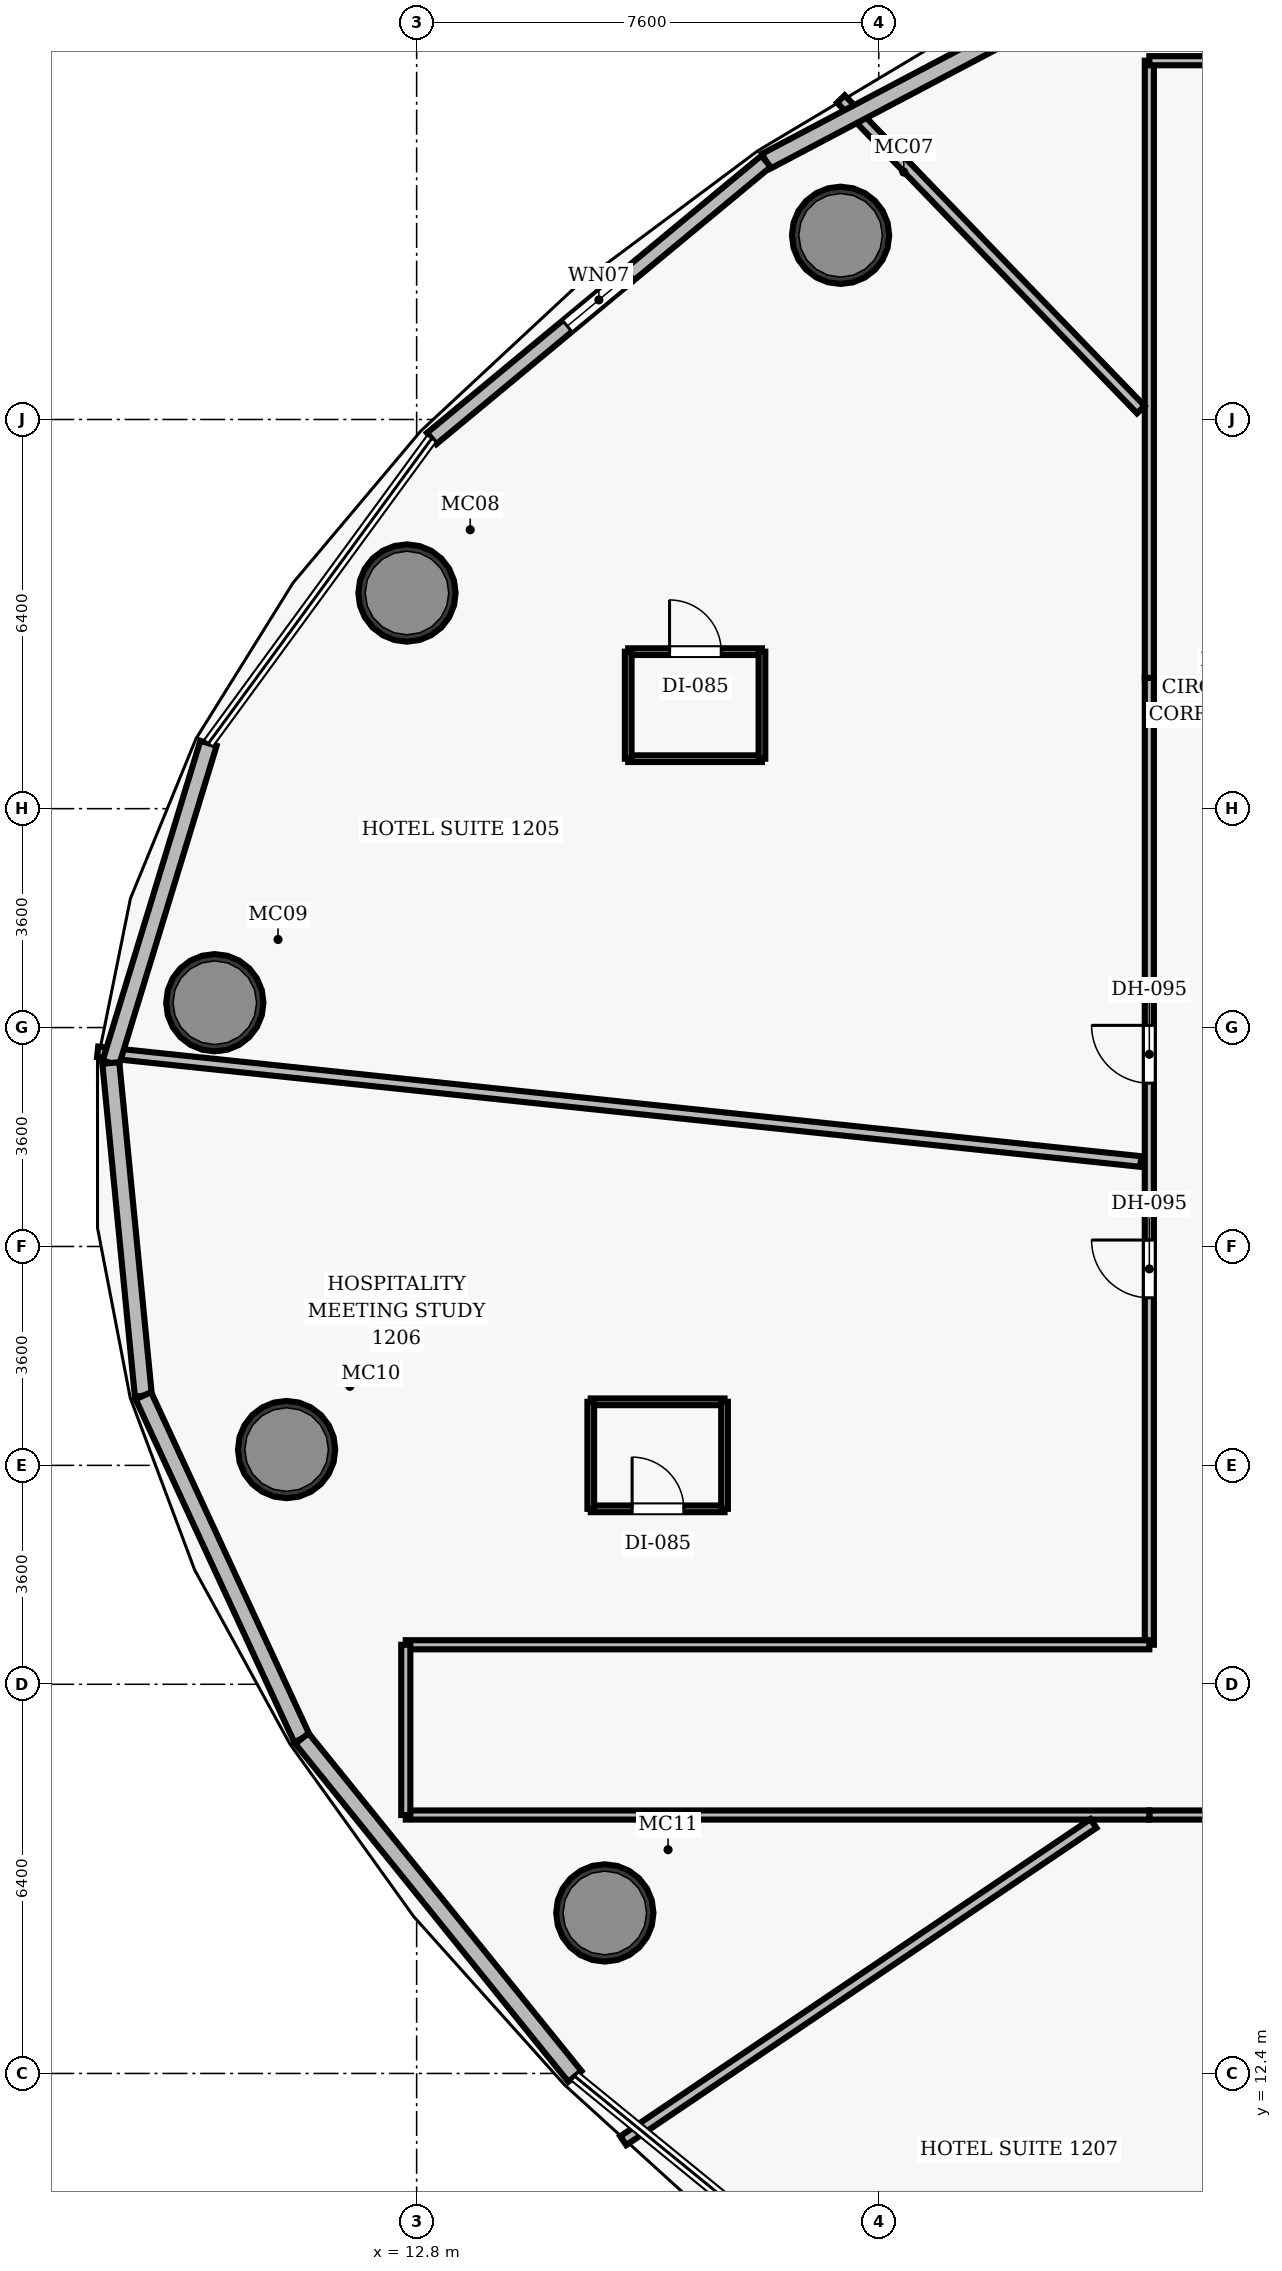
"""IFC4 building model, lengths in metres.
Left out: names, types, materials, properties, quantities, classifications, styles, units other than length and angle.
Written with IfcOpenShell. Run it as: python <this file> out.ifc"""

import sys

from ifc_helpers import new_model, si_unit, direction, frame, frame_2d, origin, origin_2d, place, context, subcontext, project, spatial, rectangle, hollow_circle, extrude, element, fill, save


model = new_model("IFC4")
c1 = context("Model", 3, precision=1e-05, world=origin(), true_north=direction((0.0, 1.0)))
c2 = subcontext(c1, "Body", "Model", "MODEL_VIEW")
j1 = project(units=[si_unit("LENGTHUNIT", "METRE"), si_unit("PLANEANGLEUNIT", "RADIAN")], contexts=[c1])
p1 = place(None, origin())
s1 = spatial("IfcSite", under=j1, at=p1, CompositionType="ELEMENT")
p2 = place(p1, origin())
s2 = spatial("IfcBuilding", under=s1, at=p2, CompositionType="ELEMENT")
p3 = place(p2, frame((0.0, 0.0, 58.9)))
s3 = spatial("IfcBuildingStorey", under=s2, at=p3, CompositionType="ELEMENT", Elevation=58.9)
for number, where, z_axis, x_axis in (
    (1, (19.772, 42.629, 0.0), (0.0, 0.0, 1.0), (1.0, 0.0, 0.0)),
    (2, (12.641, 36.746, 0.0), (0.0, 0.0, 1.0), (1.0, 0.0, 0.0)),
    (3, (9.48, 30.008, 0.0), (0.0, 0.0, 1.0), (1.0, 0.0, 0.0)),
    (4, (10.661, 22.66, 0.0), (0.0, 0.0, 1.0), (1.0, 0.0, 0.0)),
    (5, (15.895, 15.04, 0.0), (0.0, 0.0, 1.0), (1.0, 0.0, 0.0)),
):
    element("IfcColumn", number, at=place(p3, frame(where, z_axis=z_axis, x_axis=x_axis)), inside=s3, PredefinedType="COLUMN", context=c2, shape_type="SweptSolid", body=[
        extrude(hollow_circle(Radius=0.8, WallThickness=0.06, at=origin_2d()), origin(), (0.0, 0.0, 1.0), 3.5),
    ])
p4 = place(p3, frame((24.85, 16.65, 0.0), z_axis=(0.0, 0.0, 1.0), x_axis=(1.0, 0.0, 0.0)))
e6 = element("IfcWall", 6, at=p4, inside=s3, PredefinedType="PARTITIONING", context=c2, shape_type="SweptSolid", body=[
    extrude(rectangle(XDim=23.5, YDim=0.15, at=frame_2d((11.75, 0.0))), origin(), (0.0, 0.0, 1.0), 2.6),
])
p5 = place(p4, frame((7.573, 0.0, 0.0)))
e7 = element("IfcOpeningElement", 7, at=p5, cuts=e6, PredefinedType="OPENING", context=c2, shape_type="SweptSolid", body=[
    extrude(rectangle(XDim=0.95, YDim=2.15, at=frame_2d((0.475, 1.075))), frame((0.0, 0.085, 0.0), z_axis=(0.0, -1.0, 0.0), x_axis=(1.0, 0.0, 0.0)), (0.0, 0.0, 1.0), 0.17),
])
p6 = place(p4, frame((11.544, 0.0, 0.0)))
e8 = element("IfcOpeningElement", 8, at=p6, cuts=e6, PredefinedType="OPENING", context=c2, shape_type="SweptSolid", body=[
    extrude(rectangle(XDim=0.95, YDim=2.15, at=frame_2d((0.475, 1.075))), frame((0.0, 0.085, 0.0), z_axis=(0.0, -1.0, 0.0), x_axis=(1.0, 0.0, 0.0)), (0.0, 0.0, 1.0), 0.17),
])
p7 = place(p4, frame((18.202, 0.0, 0.0)))
e9 = element("IfcOpeningElement", 9, at=p7, cuts=e6, PredefinedType="OPENING", context=c2, shape_type="SweptSolid", body=[
    extrude(rectangle(XDim=0.95, YDim=2.15, at=frame_2d((0.475, 1.075))), frame((0.0, 0.085, 0.0), z_axis=(0.0, -1.0, 0.0), x_axis=(1.0, 0.0, 0.0)), (0.0, 0.0, 1.0), 0.17),
])
p8 = place(p3, frame((24.85, 19.45, 0.0), z_axis=(0.0, 0.0, 1.0), x_axis=(0.0, 1.0, 0.0)))
e10 = element("IfcWall", 10, at=p8, inside=s3, PredefinedType="PARTITIONING", context=c2, shape_type="SweptSolid", body=[
    extrude(rectangle(XDim=15.9, YDim=0.15, at=frame_2d((7.95, 0.0))), origin(), (0.0, 0.0, 1.0), 2.6),
])
p9 = place(p8, frame((9.236, 0.0, 0.0)))
e11 = element("IfcOpeningElement", 11, at=p9, cuts=e10, PredefinedType="OPENING", context=c2, shape_type="SweptSolid", body=[
    extrude(rectangle(XDim=0.95, YDim=2.15, at=frame_2d((0.475, 1.075))), frame((0.0, 0.085, 0.0), z_axis=(0.0, -1.0, 0.0), x_axis=(1.0, 0.0, 0.0)), (0.0, 0.0, 1.0), 0.17),
])
p10 = place(p8, frame((5.706, 0.0, 0.0)))
e12 = element("IfcOpeningElement", 12, at=p10, cuts=e10, PredefinedType="OPENING", context=c2, shape_type="SweptSolid", body=[
    extrude(rectangle(XDim=0.95, YDim=2.15, at=frame_2d((0.475, 1.075))), frame((0.0, 0.085, 0.0), z_axis=(0.0, -1.0, 0.0), x_axis=(1.0, 0.0, 0.0)), (0.0, 0.0, 1.0), 0.17),
])
for number, where, z_axis, x_axis in (
    (13, (12.621, 19.45, 0.0), (0.0, 0.0, 1.0), (1.0, 0.0, 0.0)),
    (14, (12.621, 16.65, 0.0), (0.0, 0.0, 1.0), (1.0, 0.0, 0.0)),
):
    element("IfcWall", number, at=place(p3, frame(where, z_axis=z_axis, x_axis=x_axis)), inside=s3, PredefinedType="PARTITIONING", context=c2, shape_type="SweptSolid", body=[
        extrude(rectangle(XDim=12.229, YDim=0.15, at=frame_2d((6.114, 0.0))), origin(), (0.0, 0.0, 1.0), 2.6),
    ])
p11 = place(p3, frame((12.621, 16.65, 0.0), z_axis=(0.0, 0.0, 1.0), x_axis=(0.0, 1.0, 0.0)))
e15 = element("IfcWall", 15, at=p11, inside=s3, PredefinedType="PARTITIONING", context=c2, shape_type="SweptSolid", body=[
    extrude(rectangle(XDim=2.8, YDim=0.15, at=frame_2d((1.4, 0.0))), origin(), (0.0, 0.0, 1.0), 2.6),
])
p12 = place(p3, frame((24.85, 35.35, 0.0), z_axis=(0.0, 0.0, 1.0), x_axis=(0.0, 1.0, 0.0)))
e16 = element("IfcWall", 16, at=p12, inside=s3, PredefinedType="PARTITIONING", context=c2, shape_type="SweptSolid", body=[
    extrude(rectangle(XDim=10.15, YDim=0.15, at=frame_2d((5.075, 0.0))), origin(), (0.0, 0.0, 1.0), 2.6),
])
p13 = place(p3, frame((24.85, 45.5, 0.0), z_axis=(0.0, 0.0, 1.0), x_axis=(1.0, 0.0, 0.0)))
e17 = element("IfcWall", 17, at=p13, inside=s3, PredefinedType="PARTITIONING", context=c2, shape_type="SweptSolid", body=[
    extrude(rectangle(XDim=2.8, YDim=0.15, at=frame_2d((1.4, 0.0))), origin(), (0.0, 0.0, 1.0), 2.6),
])
p14 = place(p3, frame((24.71, 39.762, 0.0), z_axis=(0.0, 0.0, 1.0), x_axis=(-0.694655869991, 0.719342215004, 0.0)))
e18 = element("IfcWall", 18, at=p14, inside=s3, PredefinedType="PARTITIONING", context=c2, shape_type="SweptSolid", body=[
    extrude(rectangle(XDim=7.101, YDim=0.175, at=frame_2d((3.55, 0.0))), origin(), (0.0, 0.0, 1.0), 2.6),
])
p15 = place(p3, frame((24.71, 27.397, 0.0), z_axis=(0.0, 0.0, 1.0), x_axis=(-0.994520563906, 0.104541130512, 0.0)))
e19 = element("IfcWall", 19, at=p15, inside=s3, PredefinedType="PARTITIONING", context=c2, shape_type="SweptSolid", body=[
    extrude(rectangle(XDim=17.251, YDim=0.175, at=frame_2d((8.625, 0.0))), origin(), (0.0, 0.0, 1.0), 2.6),
])
p16 = place(p3, frame((23.93, 16.51, 0.0), z_axis=(0.0, 0.0, 1.0), x_axis=(-0.829034032369, -0.559198151976, 0.0)))
e20 = element("IfcWall", 20, at=p16, inside=s3, PredefinedType="PARTITIONING", context=c2, shape_type="SweptSolid", body=[
    extrude(rectangle(XDim=9.327, YDim=0.175, at=frame_2d((4.664, 0.0))), origin(), (0.0, 0.0, 1.0), 2.6),
])
p17 = place(p3, frame((16.279, 34.022, 0.0), z_axis=(0.0, 0.0, 1.0), x_axis=(1.0, 0.0, 0.0)))
e21 = element("IfcWall", 21, at=p17, inside=s3, PredefinedType="PARTITIONING", context=c2, shape_type="SweptSolid", body=[
    extrude(rectangle(XDim=2.2, YDim=0.11, at=frame_2d((1.1, 0.0))), origin(), (0.0, 0.0, 1.0), 2.6),
])
p18 = place(p3, frame((16.279, 35.782, 0.0), z_axis=(0.0, 0.0, 1.0), x_axis=(1.0, 0.0, 0.0)))
e22 = element("IfcWall", 22, at=p18, inside=s3, PredefinedType="PARTITIONING", context=c2, shape_type="SweptSolid", body=[
    extrude(rectangle(XDim=2.2, YDim=0.11, at=frame_2d((1.1, 0.0))), origin(), (0.0, 0.0, 1.0), 2.6),
])
p19 = place(p18, frame((0.68, 0.0, 0.0)))
e23 = element("IfcOpeningElement", 23, at=p19, cuts=e22, PredefinedType="OPENING", context=c2, shape_type="SweptSolid", body=[
    extrude(rectangle(XDim=0.85, YDim=2.1, at=frame_2d((0.425, 1.05))), frame((0.0, 0.065, 0.0), z_axis=(0.0, -1.0, 0.0), x_axis=(1.0, 0.0, 0.0)), (0.0, 0.0, 1.0), 0.13),
])
for number, where, z_axis, x_axis in (
    (24, (16.279, 34.022, 0.0), (0.0, 0.0, 1.0), (0.0, 1.0, 0.0)),
    (25, (18.479, 34.022, 0.0), (0.0, 0.0, 1.0), (0.0, 1.0, 0.0)),
):
    element("IfcWall", number, at=place(p3, frame(where, z_axis=z_axis, x_axis=x_axis)), inside=s3, PredefinedType="PARTITIONING", context=c2, shape_type="SweptSolid", body=[
        extrude(rectangle(XDim=1.76, YDim=0.11, at=frame_2d((0.88, 0.0))), origin(), (0.0, 0.0, 1.0), 2.6),
    ])
p20 = place(p3, frame((15.664, 21.685, 0.0), z_axis=(0.0, 0.0, 1.0), x_axis=(1.0, 0.0, 0.0)))
e26 = element("IfcWall", 26, at=p20, inside=s3, PredefinedType="PARTITIONING", context=c2, shape_type="SweptSolid", body=[
    extrude(rectangle(XDim=2.2, YDim=0.11, at=frame_2d((1.1, 0.0))), origin(), (0.0, 0.0, 1.0), 2.6),
])
p21 = place(p20, frame((0.68, 0.0, 0.0)))
e27 = element("IfcOpeningElement", 27, at=p21, cuts=e26, PredefinedType="OPENING", context=c2, shape_type="SweptSolid", body=[
    extrude(rectangle(XDim=0.85, YDim=2.1, at=frame_2d((0.425, 1.05))), frame((0.0, 0.065, 0.0), z_axis=(0.0, -1.0, 0.0), x_axis=(1.0, 0.0, 0.0)), (0.0, 0.0, 1.0), 0.13),
])
p22 = place(p3, frame((15.664, 23.445, 0.0), z_axis=(0.0, 0.0, 1.0), x_axis=(1.0, 0.0, 0.0)))
e28 = element("IfcWall", 28, at=p22, inside=s3, PredefinedType="PARTITIONING", context=c2, shape_type="SweptSolid", body=[
    extrude(rectangle(XDim=2.2, YDim=0.11, at=frame_2d((1.1, 0.0))), origin(), (0.0, 0.0, 1.0), 2.6),
])
for number, where, z_axis, x_axis in (
    (29, (15.664, 21.685, 0.0), (0.0, 0.0, 1.0), (0.0, 1.0, 0.0)),
    (30, (17.864, 21.685, 0.0), (0.0, 0.0, 1.0), (0.0, 1.0, 0.0)),
):
    element("IfcWall", number, at=place(p3, frame(where, z_axis=z_axis, x_axis=x_axis)), inside=s3, PredefinedType="PARTITIONING", context=c2, shape_type="SweptSolid", body=[
        extrude(rectangle(XDim=1.76, YDim=0.11, at=frame_2d((0.88, 0.0))), origin(), (0.0, 0.0, 1.0), 2.6),
    ])
p23 = place(p3, frame((18.546, 43.845, 0.0), z_axis=(0.0, 0.0, 1.0), x_axis=(0.884435063854, 0.466663280991, 0.0)))
e31 = element("IfcWall", 31, at=p23, inside=s3, PredefinedType="SOLIDWALL", context=c2, shape_type="SweptSolid", body=[
    extrude(rectangle(XDim=7.845, YDim=0.28, at=frame_2d((3.922, 0.0))), origin(), (0.0, 0.0, 1.0), 3.25),
])
p24 = place(p3, frame((13.047, 39.286, 0.0), z_axis=(0.0, 0.0, 1.0), x_axis=(0.769818580763, 0.638262761496, 0.0)))
e32 = element("IfcWall", 32, at=p24, inside=s3, PredefinedType="SOLIDWALL", context=c2, shape_type="SweptSolid", body=[
    extrude(rectangle(XDim=7.143, YDim=0.24, at=frame_2d((3.572, 0.0))), origin(), (0.0, 0.0, 1.0), 3.25),
])
p25 = place(p24, frame((2.896, 0.0, 0.85)))
e33 = element("IfcOpeningElement", 33, at=p25, cuts=e32, PredefinedType="OPENING", context=c2, shape_type="SweptSolid", body=[
    extrude(rectangle(XDim=1.35, YDim=1.65, at=frame_2d((0.675, 0.825))), frame((0.0, 0.13, 0.0), z_axis=(0.0, -1.0, 0.0), x_axis=(1.0, 0.0, 0.0)), (0.0, 0.0, 1.0), 0.26),
])
p26 = place(p3, frame((7.77, 29.017, 0.0), z_axis=(0.0, 0.0, 1.0), x_axis=(0.292172276323, 0.956365704607, 0.0)))
e34 = element("IfcWall", 34, at=p26, inside=s3, PredefinedType="SOLIDWALL", context=c2, shape_type="SweptSolid", body=[
    extrude(rectangle(XDim=5.498, YDim=0.28, at=frame_2d((2.749, 0.0))), origin(), (0.0, 0.0, 1.0), 3.25),
])
p27 = place(p3, frame((8.305, 23.546, 0.0), z_axis=(0.0, 0.0, 1.0), x_axis=(-0.097348893099, 0.995250316761, 0.0)))
e35 = element("IfcWall", 35, at=p27, inside=s3, PredefinedType="SOLIDWALL", context=c2, shape_type="SweptSolid", body=[
    extrude(rectangle(XDim=5.497, YDim=0.28, at=frame_2d((2.749, 0.0))), origin(), (0.0, 0.0, 1.0), 3.25),
])
p28 = place(p3, frame((10.913, 17.908, 0.0), z_axis=(0.0, 0.0, 1.0), x_axis=(-0.419795716815, 0.907618618222, 0.0)))
e36 = element("IfcWall", 36, at=p28, inside=s3, PredefinedType="SOLIDWALL", context=c2, shape_type="SweptSolid", body=[
    extrude(rectangle(XDim=6.212, YDim=0.28, at=frame_2d((3.106, 0.0))), origin(), (0.0, 0.0, 1.0), 3.25),
])
p29 = place(p3, frame((15.402, 12.352, 0.0), z_axis=(0.0, 0.0, 1.0), x_axis=(-0.628468371522, 0.777835140628, 0.0)))
e37 = element("IfcWall", 37, at=p29, inside=s3, PredefinedType="SOLIDWALL", context=c2, shape_type="SweptSolid", body=[
    extrude(rectangle(XDim=7.143, YDim=0.28, at=frame_2d((3.571, 0.0))), origin(), (0.0, 0.0, 1.0), 3.25),
])
p30 = place(p9, origin())
e38 = element("IfcDoor", 38, at=p30, inside=s3, OperationType="SINGLE_SWING_RIGHT", PredefinedType="DOOR", context=c2, shape_type="SweptSolid", body=[
    extrude(rectangle(XDim=0.95, YDim=2.15, at=frame_2d((0.475, 1.075))), frame((0.0, 0.025, 0.0), z_axis=(0.0, -1.0, 0.0), x_axis=(1.0, 0.0, 0.0)), (0.0, 0.0, 1.0), 0.05),
])
fill(e11, e38)
p31 = place(p19, origin())
e39 = element("IfcDoor", 39, at=p31, inside=s3, OperationType="SINGLE_SWING_LEFT", PredefinedType="DOOR", context=c2, shape_type="SweptSolid", body=[
    extrude(rectangle(XDim=0.85, YDim=2.1, at=frame_2d((0.425, 1.05))), frame((0.0, 0.025, 0.0), z_axis=(0.0, -1.0, 0.0), x_axis=(1.0, 0.0, 0.0)), (0.0, 0.0, 1.0), 0.05),
])
fill(e23, e39)
p32 = place(p10, origin())
e40 = element("IfcDoor", 40, at=p32, inside=s3, OperationType="SINGLE_SWING_RIGHT", PredefinedType="DOOR", context=c2, shape_type="SweptSolid", body=[
    extrude(rectangle(XDim=0.95, YDim=2.15, at=frame_2d((0.475, 1.075))), frame((0.0, 0.025, 0.0), z_axis=(0.0, -1.0, 0.0), x_axis=(1.0, 0.0, 0.0)), (0.0, 0.0, 1.0), 0.05),
])
fill(e12, e40)
p33 = place(p21, origin())
e41 = element("IfcDoor", 41, at=p33, inside=s3, OperationType="SINGLE_SWING_LEFT", PredefinedType="DOOR", context=c2, shape_type="SweptSolid", body=[
    extrude(rectangle(XDim=0.85, YDim=2.1, at=frame_2d((0.425, 1.05))), frame((0.0, 0.025, 0.0), z_axis=(0.0, -1.0, 0.0), x_axis=(1.0, 0.0, 0.0)), (0.0, 0.0, 1.0), 0.05),
])
fill(e27, e41)
p34 = place(p25, origin())
e42 = element("IfcWindow", 42, at=p34, inside=s3, PartitioningType="SINGLE_PANEL", PredefinedType="WINDOW", context=c2, shape_type="SweptSolid", body=[
    extrude(rectangle(XDim=1.35, YDim=1.65, at=frame_2d((0.675, 0.825))), frame((0.0, 0.03, 0.0), z_axis=(0.0, -1.0, 0.0), x_axis=(1.0, 0.0, 0.0)), (0.0, 0.0, 1.0), 0.06),
])
fill(e33, e42)
save(model, sys.argv[1])
